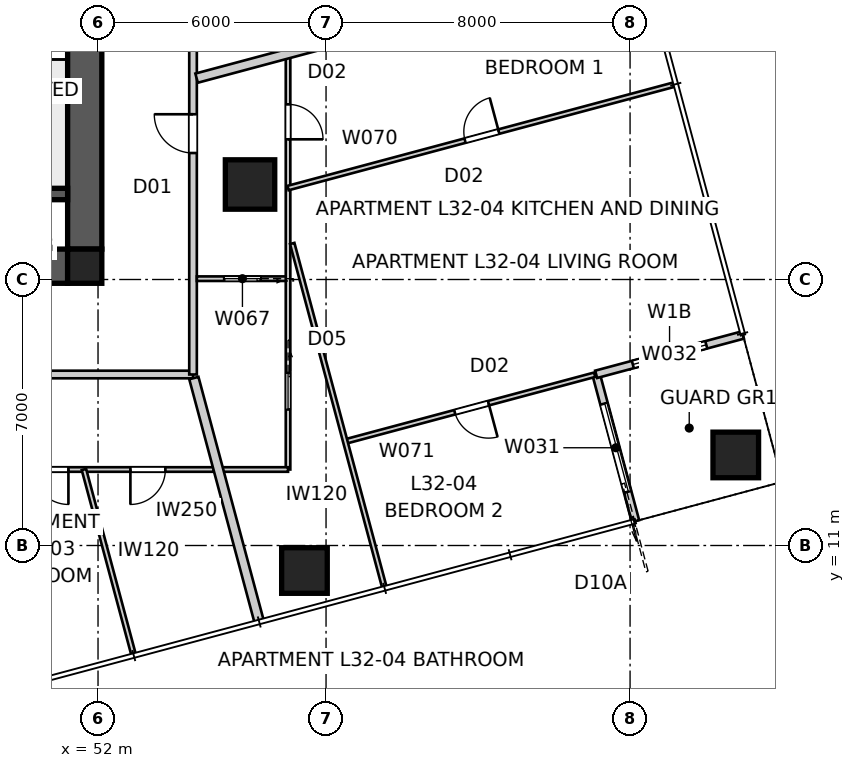
"""IFC4 building model, lengths in metres.
Left out: names, types, materials, properties, quantities, classifications, styles, units other than length and angle.
Written with IfcOpenShell. Run it as: python <this file> out.ifc"""

import sys

from ifc_helpers import new_model, si_unit, direction, frame, frame_2d, origin, origin_2d, place, context, subcontext, project, spatial, polyline, rectangle, outline, extrude, element, fill, save


model = new_model("IFC4")
c1 = context("Model", 3, precision=1e-05, world=origin(), true_north=direction((0.0, 1.0)))
c2 = subcontext(c1, "Body", "Model", "MODEL_VIEW")
j1 = project(units=[si_unit("LENGTHUNIT", "METRE"), si_unit("PLANEANGLEUNIT", "RADIAN")], contexts=[c1])
p1 = place(None, origin())
s1 = spatial("IfcSite", under=j1, at=p1, CompositionType="ELEMENT")
p2 = place(p1, origin())
s2 = spatial("IfcBuilding", under=s1, at=p2, CompositionType="ELEMENT")
p3 = place(p2, frame((0.0, 0.0, 118.4)))
s3 = spatial("IfcBuildingStorey", under=s2, at=p3, CompositionType="ELEMENT", Elevation=118.4)
p4 = place(p3, frame((51.2, 18.35, 0.0), z_axis=(0.0, 0.0, 1.0), x_axis=(-1.0, 0.0, 0.0)))
e1 = element("IfcWall", 1, at=p4, inside=s3, PredefinedType="SHEAR", context=c2, shape_type="SweptSolid", body=[
    extrude(outline(polyline([(0.0, -0.45), (22.4, -0.45), (22.4, -0.025), (22.85, -0.025), (22.85, 0.025), (22.4, 0.025), (22.4, 0.45), (0.0, 0.45), (0.0, 0.025), (-0.45, 0.025), (-0.45, -0.025), (0.0, -0.025), (0.0, -0.45)])), origin(), (0.0, 0.0, 1.0), 3.4),
])
p5 = place(p3, frame((51.65, 18.8, 0.0), z_axis=(0.0, 0.0, 1.0), x_axis=(0.0, 1.0, 0.0)))
e2 = element("IfcWall", 2, at=p5, inside=s3, PredefinedType="SHEAR", context=c2, shape_type="SweptSolid", body=[
    extrude(outline(polyline([(0.0, -0.45), (22.4, -0.45), (22.4, -0.025), (22.85, -0.025), (22.85, 0.025), (22.4, 0.025), (22.4, 0.45), (0.0, 0.45), (0.0, 0.025), (-0.45, 0.025), (-0.45, -0.025), (0.0, -0.025), (0.0, -0.45)])), origin(), (0.0, 0.0, 1.0), 3.4),
])
p6 = place(p5, frame((11.14, 0.0, 0.0)))
e3 = element("IfcOpeningElement", 3, at=p6, cuts=e2, PredefinedType="OPENING", context=c2, shape_type="SweptSolid", body=[
    extrude(rectangle(XDim=1.02, YDim=2.4, at=frame_2d((0.51, 1.2))), frame((0.0, 0.46, 0.0), z_axis=(0.0, -1.0, 0.0), x_axis=(1.0, 0.0, 0.0)), (0.0, 0.0, 1.0), 0.92),
])
p7 = place(p3, frame((51.2, 20.25, 0.0), z_axis=(0.0, 0.0, 1.0), x_axis=(-1.0, 0.0, 0.0)))
e4 = element("IfcWall", 4, at=p7, inside=s3, PredefinedType="SHEAR", context=c2, shape_type="SweptSolid", body=[
    extrude(rectangle(XDim=3.5, YDim=0.3, at=frame_2d((1.75, 0.0))), origin(), (0.0, 0.0, 1.0), 3.4),
])
p8 = place(p3, frame((51.65, 18.35, 0.0), z_axis=(0.0, 0.0, 1.0), x_axis=(1.0, 0.0, 0.0)))
e5 = element("IfcColumn", 5, at=p8, inside=s3, PredefinedType="COLUMN", context=c2, shape_type="SweptSolid", body=[
    extrude(rectangle(XDim=0.9, YDim=0.9, at=origin_2d()), origin(), (0.0, 0.0, 1.0), 3.4),
])
for number, where, z_axis, x_axis in (
    (6, (57.432, 10.342, 0.0), (0.0, 0.0, 1.0), (1.0, 0.0, 0.0)),
    (7, (68.781, 13.383, 0.0), (0.0, 0.0, 1.0), (1.0, 0.0, 0.0)),
):
    element("IfcColumn", number, at=place(p3, frame(where, z_axis=z_axis, x_axis=x_axis)), inside=s3, PredefinedType="COLUMN", context=c2, shape_type="SweptSolid", body=[
        extrude(rectangle(XDim=1.2, YDim=1.2, at=origin_2d()), origin(), (0.0, 0.0, 1.0), 3.4),
    ])
p9 = place(p3, frame((56.0, 20.5, 0.0), z_axis=(0.0, 0.0, 1.0), x_axis=(1.0, 0.0, 0.0)))
e8 = element("IfcColumn", 8, at=p9, inside=s3, PredefinedType="COLUMN", context=c2, shape_type="SweptSolid", body=[
    extrude(rectangle(XDim=1.3, YDim=1.3, at=origin_2d()), origin(), (0.0, 0.0, 1.0), 3.4),
])
p10 = place(p3, frame((66.143, 11.641, 0.0), z_axis=(0.0, 0.0, 1.0), x_axis=(-0.258843877716, 0.965919172068, 0.0)))
e9 = element("IfcWall", 9, at=p10, inside=s3, PredefinedType="SOLIDWALL", context=c2, shape_type="SweptSolid", body=[
    extrude(rectangle(XDim=4.0, YDim=0.2, at=frame_2d((2.0, 0.0))), origin(), (0.0, 0.0, 1.0), 3.25),
])
p11 = place(p10, frame((0.8, 0.0, 0.0)))
e10 = element("IfcOpeningElement", 10, at=p11, cuts=e9, PredefinedType="OPENING", context=c2, shape_type="SweptSolid", body=[
    extrude(rectangle(XDim=2.4, YDim=2.1, at=frame_2d((1.2, 1.05))), frame((0.0, 0.11, 0.0), z_axis=(0.0, -1.0, 0.0), x_axis=(1.0, 0.0, 0.0)), (0.0, 0.0, 1.0), 0.22),
])
p12 = place(p3, frame((65.107, 15.504, 0.0), z_axis=(0.0, 0.0, 1.0), x_axis=(0.965934430412, 0.258786931944, 0.0)))
e11 = element("IfcWall", 11, at=p12, inside=s3, PredefinedType="SOLIDWALL", context=c2, shape_type="SweptSolid", body=[
    extrude(rectangle(XDim=4.0, YDim=0.2, at=frame_2d((2.0, 0.0))), origin(), (0.0, 0.0, 1.0), 3.25),
])
p13 = place(p12, frame((1.0, 0.0, 0.45)))
e12 = element("IfcOpeningElement", 12, at=p13, cuts=e11, PredefinedType="OPENING", context=c2, shape_type="SweptSolid", body=[
    extrude(rectangle(XDim=2.0, YDim=1.8, at=frame_2d((1.0, 0.9))), frame((0.0, 0.11, 0.0), z_axis=(0.0, -1.0, 0.0), x_axis=(1.0, 0.0, 0.0)), (0.0, 0.0, 1.0), 0.22),
])
p14 = place(p3, frame((26.3, 15.5, 0.0), z_axis=(0.0, 0.0, 1.0), x_axis=(1.0, 0.0, 0.0)))
e13 = element("IfcWall", 13, at=p14, inside=s3, PredefinedType="PARTITIONING", context=c2, shape_type="SweptSolid", body=[
    extrude(rectangle(XDim=28.2, YDim=0.2, at=frame_2d((14.1, 0.0))), origin(), (0.0, 0.0, 1.0), 3.25),
])
p15 = place(p14, frame((21.474, 0.0, 0.0)))
e14 = element("IfcOpeningElement", 14, at=p15, cuts=e13, PredefinedType="OPENING", context=c2, shape_type="SweptSolid", body=[
    extrude(rectangle(XDim=1.02, YDim=2.34, at=frame_2d((0.51, 1.17))), frame((0.0, 0.11, 0.0), z_axis=(0.0, -1.0, 0.0), x_axis=(1.0, 0.0, 0.0)), (0.0, 0.0, 1.0), 0.22),
])
p16 = place(p14, frame((1.353, 0.0, 0.0)))
e15 = element("IfcOpeningElement", 15, at=p16, cuts=e13, PredefinedType="OPENING", context=c2, shape_type="SweptSolid", body=[
    extrude(rectangle(XDim=1.02, YDim=2.1, at=frame_2d((0.51, 1.05))), frame((0.0, 0.11, 0.0), z_axis=(0.0, -1.0, 0.0), x_axis=(1.0, 0.0, 0.0)), (0.0, 0.0, 1.0), 0.22),
])
p17 = place(p3, frame((54.5, 15.5, 0.0), z_axis=(0.0, 0.0, 1.0), x_axis=(0.0, 1.0, 0.0)))
e16 = element("IfcWall", 16, at=p17, inside=s3, PredefinedType="PARTITIONING", context=c2, shape_type="SweptSolid", body=[
    extrude(rectangle(XDim=29.0, YDim=0.2, at=frame_2d((14.5, 0.0))), origin(), (0.0, 0.0, 1.0), 3.25),
])
p18 = place(p17, frame((24.76, 0.0, 0.0)))
e17 = element("IfcOpeningElement", 17, at=p18, cuts=e16, PredefinedType="OPENING", context=c2, shape_type="SweptSolid", body=[
    extrude(rectangle(XDim=1.02, YDim=2.1, at=frame_2d((0.51, 1.05))), frame((0.0, 0.11, 0.0), z_axis=(0.0, -1.0, 0.0), x_axis=(1.0, 0.0, 0.0)), (0.0, 0.0, 1.0), 0.22),
])
p19 = place(p17, frame((5.829, 0.0, 0.0)))
e18 = element("IfcOpeningElement", 18, at=p19, cuts=e16, PredefinedType="OPENING", context=c2, shape_type="SweptSolid", body=[
    extrude(rectangle(XDim=1.02, YDim=2.34, at=frame_2d((0.51, 1.17))), frame((0.0, 0.11, 0.0), z_axis=(0.0, -1.0, 0.0), x_axis=(1.0, 0.0, 0.0)), (0.0, 0.0, 1.0), 0.22),
])
p20 = place(p17, frame((9.559, 0.0, 0.0)))
e19 = element("IfcOpeningElement", 19, at=p20, cuts=e16, PredefinedType="OPENING", context=c2, shape_type="SweptSolid", body=[
    extrude(rectangle(XDim=1.02, YDim=2.34, at=frame_2d((0.51, 1.17))), frame((0.0, 0.11, 0.0), z_axis=(0.0, -1.0, 0.0), x_axis=(1.0, 0.0, 0.0)), (0.0, 0.0, 1.0), 0.22),
])
p21 = place(p3, frame((56.242, 8.988, 0.0), z_axis=(0.0, 0.0, 1.0), x_axis=(-0.25880587229, 0.965929355837, 0.0)))
e20 = element("IfcWall", 20, at=p21, inside=s3, PredefinedType="PARTITIONING", context=c2, shape_type="SweptSolid", body=[
    extrude(rectangle(XDim=6.645, YDim=0.25, at=frame_2d((3.322, 0.0))), origin(), (0.0, 0.0, 1.0), 3.25),
])
p22 = place(p3, frame((66.318, 26.44, 0.0), z_axis=(0.0, 0.0, 1.0), x_axis=(-0.965924438766, -0.258824223352, 0.0)))
e21 = element("IfcWall", 21, at=p22, inside=s3, PredefinedType="PARTITIONING", context=c2, shape_type="SweptSolid", body=[
    extrude(rectangle(XDim=12.138, YDim=0.25, at=frame_2d((6.069, 0.0))), origin(), (0.0, 0.0, 1.0), 3.25),
])
p23 = place(p3, frame((55.046, 13.0, 0.0), z_axis=(0.0, 0.0, 1.0), x_axis=(-1.0, 0.0, 0.0)))
e22 = element("IfcWall", 22, at=p23, inside=s3, PredefinedType="PARTITIONING", context=c2, shape_type="SweptSolid", body=[
    extrude(rectangle(XDim=23.693, YDim=0.12, at=frame_2d((11.846, 0.0))), origin(), (0.0, 0.0, 1.0), 2.55),
])
p24 = place(p23, frame((8.262, 0.0, 0.0)))
e23 = element("IfcOpeningElement", 23, at=p24, cuts=e22, PredefinedType="OPENING", context=c2, shape_type="SweptSolid", body=[
    extrude(rectangle(XDim=0.92, YDim=2.34, at=frame_2d((0.46, 1.17))), frame((0.0, 0.07, 0.0), z_axis=(0.0, -1.0, 0.0), x_axis=(1.0, 0.0, 0.0)), (0.0, 0.0, 1.0), 0.14),
])
p25 = place(p23, frame((3.825, 0.0, 0.0)))
e24 = element("IfcOpeningElement", 24, at=p25, cuts=e22, PredefinedType="OPENING", context=c2, shape_type="SweptSolid", body=[
    extrude(rectangle(XDim=0.92, YDim=2.34, at=frame_2d((0.46, 1.17))), frame((0.0, 0.07, 0.0), z_axis=(0.0, -1.0, 0.0), x_axis=(1.0, 0.0, 0.0)), (0.0, 0.0, 1.0), 0.14),
])
p26 = place(p23, frame((1.274, 0.0, 0.0)))
e25 = element("IfcOpeningElement", 25, at=p26, cuts=e22, PredefinedType="OPENING", context=c2, shape_type="SweptSolid", body=[
    extrude(rectangle(XDim=0.92, YDim=2.34, at=frame_2d((0.46, 1.17))), frame((0.0, 0.07, 0.0), z_axis=(0.0, -1.0, 0.0), x_axis=(1.0, 0.0, 0.0)), (0.0, 0.0, 1.0), 0.14),
])
p27 = place(p23, frame((13.041, 0.0, 0.0)))
e26 = element("IfcOpeningElement", 26, at=p27, cuts=e22, PredefinedType="OPENING", context=c2, shape_type="SweptSolid", body=[
    extrude(rectangle(XDim=0.96, YDim=2.1, at=frame_2d((0.48, 1.05))), frame((0.0, 0.07, 0.0), z_axis=(0.0, -1.0, 0.0), x_axis=(1.0, 0.0, 0.0)), (0.0, 0.0, 1.0), 0.14),
])
p28 = place(p23, frame((21.917, 0.0, 0.0)))
e27 = element("IfcOpeningElement", 27, at=p28, cuts=e22, PredefinedType="OPENING", context=c2, shape_type="SweptSolid", body=[
    extrude(rectangle(XDim=0.96, YDim=2.1, at=frame_2d((0.48, 1.05))), frame((0.0, 0.07, 0.0), z_axis=(0.0, -1.0, 0.0), x_axis=(1.0, 0.0, 0.0)), (0.0, 0.0, 1.0), 0.14),
])
p29 = place(p3, frame((51.63, 13.0, 0.0), z_axis=(0.0, 0.0, 1.0), x_axis=(0.258789467631, -0.965933751063, 0.0)))
e28 = element("IfcWall", 28, at=p29, inside=s3, PredefinedType="PARTITIONING", context=c2, shape_type="SweptSolid", body=[
    extrude(rectangle(XDim=5.029, YDim=0.12, at=frame_2d((2.515, 0.0))), origin(), (0.0, 0.0, 1.0), 3.25),
])
p30 = place(p3, frame((57.0, 18.021, 0.0), z_axis=(0.0, 0.0, 1.0), x_axis=(-1.0, 0.0, 0.0)))
e29 = element("IfcWall", 29, at=p30, inside=s3, PredefinedType="PARTITIONING", context=c2, shape_type="SweptSolid", body=[
    extrude(rectangle(XDim=2.4, YDim=0.12, at=frame_2d((1.2, 0.0))), origin(), (0.0, 0.0, 1.0), 3.25),
])
p31 = place(p30, frame((0.72, 0.0, 0.0)))
e30 = element("IfcOpeningElement", 30, at=p31, cuts=e29, PredefinedType="OPENING", context=c2, shape_type="SweptSolid", body=[
    extrude(rectangle(XDim=0.96, YDim=2.1, at=frame_2d((0.48, 1.05))), frame((0.0, 0.07, 0.0), z_axis=(0.0, -1.0, 0.0), x_axis=(1.0, 0.0, 0.0)), (0.0, 0.0, 1.0), 0.14),
])
p32 = place(p3, frame((57.0, 47.0, 0.0), z_axis=(0.0, 0.0, 1.0), x_axis=(0.0, -1.0, 0.0)))
e31 = element("IfcWall", 31, at=p32, inside=s3, PredefinedType="PARTITIONING", context=c2, shape_type="SweptSolid", body=[
    extrude(rectangle(XDim=34.0, YDim=0.12, at=frame_2d((17.0, 0.0))), origin(), (0.0, 0.0, 1.0), 2.55),
])
p33 = place(p32, frame((8.23, 0.0, 0.0)))
e32 = element("IfcOpeningElement", 32, at=p33, cuts=e31, PredefinedType="OPENING", context=c2, shape_type="SweptSolid", body=[
    extrude(rectangle(XDim=0.92, YDim=2.34, at=frame_2d((0.46, 1.17))), frame((0.0, 0.07, 0.0), z_axis=(0.0, -1.0, 0.0), x_axis=(1.0, 0.0, 0.0)), (0.0, 0.0, 1.0), 0.14),
])
p34 = place(p32, frame((3.192, 0.0, 0.0)))
e33 = element("IfcOpeningElement", 33, at=p34, cuts=e31, PredefinedType="OPENING", context=c2, shape_type="SweptSolid", body=[
    extrude(rectangle(XDim=0.92, YDim=2.34, at=frame_2d((0.46, 1.17))), frame((0.0, 0.07, 0.0), z_axis=(0.0, -1.0, 0.0), x_axis=(1.0, 0.0, 0.0)), (0.0, 0.0, 1.0), 0.14),
])
p35 = place(p32, frame((24.391, 0.0, 0.0)))
e34 = element("IfcOpeningElement", 34, at=p35, cuts=e31, PredefinedType="OPENING", context=c2, shape_type="SweptSolid", body=[
    extrude(rectangle(XDim=0.92, YDim=2.34, at=frame_2d((0.46, 1.17))), frame((0.0, 0.07, 0.0), z_axis=(0.0, -1.0, 0.0), x_axis=(1.0, 0.0, 0.0)), (0.0, 0.0, 1.0), 0.14),
])
p36 = place(p32, frame((21.702, 0.0, 0.0)))
e35 = element("IfcOpeningElement", 35, at=p36, cuts=e31, PredefinedType="OPENING", context=c2, shape_type="SweptSolid", body=[
    extrude(rectangle(XDim=0.92, YDim=2.34, at=frame_2d((0.46, 1.17))), frame((0.0, 0.07, 0.0), z_axis=(0.0, -1.0, 0.0), x_axis=(1.0, 0.0, 0.0)), (0.0, 0.0, 1.0), 0.14),
])
p37 = place(p32, frame((31.459, 0.0, 0.0)))
e36 = element("IfcOpeningElement", 36, at=p37, cuts=e31, PredefinedType="OPENING", context=c2, shape_type="SweptSolid", body=[
    extrude(rectangle(XDim=0.96, YDim=2.1, at=frame_2d((0.48, 1.05))), frame((0.0, 0.07, 0.0), z_axis=(0.0, -1.0, 0.0), x_axis=(1.0, 0.0, 0.0)), (0.0, 0.0, 1.0), 0.14),
])
p38 = place(p32, frame((13.759, 0.0, 0.0)))
e37 = element("IfcOpeningElement", 37, at=p38, cuts=e31, PredefinedType="OPENING", context=c2, shape_type="SweptSolid", body=[
    extrude(rectangle(XDim=0.96, YDim=2.1, at=frame_2d((0.48, 1.05))), frame((0.0, 0.07, 0.0), z_axis=(0.0, -1.0, 0.0), x_axis=(1.0, 0.0, 0.0)), (0.0, 0.0, 1.0), 0.14),
])
p39 = place(p3, frame((57.0, 13.0, 0.0), z_axis=(0.0, 0.0, 1.0), x_axis=(-1.0, 0.0, 0.0)))
e38 = element("IfcWall", 38, at=p39, inside=s3, PredefinedType="PARTITIONING", context=c2, shape_type="SweptSolid", body=[
    extrude(rectangle(XDim=1.833, YDim=0.12, at=frame_2d((0.917, 0.0))), origin(), (0.0, 0.0, 1.0), 3.25),
])
p40 = place(p3, frame((57.0, 20.406, 0.0), z_axis=(0.0, 0.0, 1.0), x_axis=(0.9659257847, 0.258819200315, 0.0)))
e39 = element("IfcWall", 39, at=p40, inside=s3, PredefinedType="PARTITIONING", context=c2, shape_type="SweptSolid", body=[
    extrude(rectangle(XDim=10.522, YDim=0.12, at=frame_2d((5.261, 0.0))), origin(), (0.0, 0.0, 1.0), 2.722),
])
p41 = place(p40, frame((4.821, 0.0, 0.0)))
e40 = element("IfcOpeningElement", 40, at=p41, cuts=e39, PredefinedType="OPENING", context=c2, shape_type="SweptSolid", body=[
    extrude(rectangle(XDim=0.92, YDim=2.34, at=frame_2d((0.46, 1.17))), frame((0.0, 0.07, 0.0), z_axis=(0.0, -1.0, 0.0), x_axis=(1.0, 0.0, 0.0)), (0.0, 0.0, 1.0), 0.14),
])
p42 = place(p3, frame((65.069, 15.494, 0.0), z_axis=(0.0, 0.0, 1.0), x_axis=(-0.965922865286, -0.258830095464, 0.0)))
e41 = element("IfcWall", 41, at=p42, inside=s3, PredefinedType="PARTITIONING", context=c2, shape_type="SweptSolid", body=[
    extrude(rectangle(XDim=6.793, YDim=0.12, at=frame_2d((3.396, 0.0))), origin(), (0.0, 0.0, 1.0), 3.25),
])
p43 = place(p42, frame((2.892, 0.0, 0.0)))
e42 = element("IfcOpeningElement", 42, at=p43, cuts=e41, PredefinedType="OPENING", context=c2, shape_type="SweptSolid", body=[
    extrude(rectangle(XDim=0.92, YDim=2.34, at=frame_2d((0.46, 1.17))), frame((0.0, 0.07, 0.0), z_axis=(0.0, -1.0, 0.0), x_axis=(1.0, 0.0, 0.0)), (0.0, 0.0, 1.0), 0.14),
])
p44 = place(p3, frame((59.532, 9.911, 0.0), z_axis=(0.0, 0.0, 1.0), x_axis=(-0.25881390457, 0.965927203676, 0.0)))
e43 = element("IfcWall", 43, at=p44, inside=s3, PredefinedType="PARTITIONING", context=c2, shape_type="SweptSolid", body=[
    extrude(rectangle(XDim=9.357, YDim=0.12, at=frame_2d((4.678, 0.0))), origin(), (0.0, 0.0, 1.0), 2.638),
])
p45 = place(p11, origin())
e44 = element("IfcDoor", 44, at=p45, inside=s3, OperationType="SLIDING_TO_LEFT", PredefinedType="DOOR", context=c2, shape_type="SweptSolid", body=[
    extrude(rectangle(XDim=2.4, YDim=2.1, at=frame_2d((1.2, 1.05))), frame((0.0, 0.025, 0.0), z_axis=(0.0, -1.0, 0.0), x_axis=(1.0, 0.0, 0.0)), (0.0, 0.0, 1.0), 0.05),
])
fill(e10, e44)
p46 = place(p13, origin())
e45 = element("IfcWindow", 45, at=p46, inside=s3, PartitioningType="SINGLE_PANEL", PredefinedType="WINDOW", context=c2, shape_type="SweptSolid", body=[
    extrude(rectangle(XDim=2.0, YDim=1.8, at=frame_2d((1.0, 0.9))), frame((0.0, 0.03, 0.0), z_axis=(0.0, -1.0, 0.0), x_axis=(1.0, 0.0, 0.0)), (0.0, 0.0, 1.0), 0.06),
])
fill(e12, e45)
p47 = place(p19, origin())
e46 = element("IfcDoor", 46, at=p47, inside=s3, OperationType="SINGLE_SWING_RIGHT", PredefinedType="DOOR", context=c2, shape_type="SweptSolid", body=[
    extrude(rectangle(XDim=1.02, YDim=2.34, at=frame_2d((0.51, 1.17))), frame((0.0, 0.025, 0.0), z_axis=(0.0, -1.0, 0.0), x_axis=(1.0, 0.0, 0.0)), (0.0, 0.0, 1.0), 0.05),
])
fill(e18, e46)
p48 = place(p25, origin())
e47 = element("IfcDoor", 47, at=p48, inside=s3, OperationType="SINGLE_SWING_LEFT", PredefinedType="DOOR", context=c2, shape_type="SweptSolid", body=[
    extrude(rectangle(XDim=0.92, YDim=2.34, at=frame_2d((0.46, 1.17))), frame((0.0, 0.025, 0.0), z_axis=(0.0, -1.0, 0.0), x_axis=(1.0, 0.0, 0.0)), (0.0, 0.0, 1.0), 0.05),
])
fill(e24, e47)
p49 = place(p26, origin())
e48 = element("IfcDoor", 48, at=p49, inside=s3, OperationType="SINGLE_SWING_RIGHT", PredefinedType="DOOR", context=c2, shape_type="SweptSolid", body=[
    extrude(rectangle(XDim=0.92, YDim=2.34, at=frame_2d((0.46, 1.17))), frame((0.0, 0.025, 0.0), z_axis=(0.0, -1.0, 0.0), x_axis=(1.0, 0.0, 0.0)), (0.0, 0.0, 1.0), 0.05),
])
fill(e25, e48)
p50 = place(p35, origin())
e49 = element("IfcDoor", 49, at=p50, inside=s3, OperationType="SINGLE_SWING_RIGHT", PredefinedType="DOOR", context=c2, shape_type="SweptSolid", body=[
    extrude(rectangle(XDim=0.92, YDim=2.34, at=frame_2d((0.46, 1.17))), frame((0.0, 0.025, 0.0), z_axis=(0.0, -1.0, 0.0), x_axis=(1.0, 0.0, 0.0)), (0.0, 0.0, 1.0), 0.05),
])
fill(e34, e49)
p51 = place(p31, origin())
e50 = element("IfcDoor", 50, at=p51, inside=s3, OperationType="SLIDING_TO_LEFT", PredefinedType="DOOR", context=c2, shape_type="SweptSolid", body=[
    extrude(rectangle(XDim=0.96, YDim=2.1, at=frame_2d((0.48, 1.05))), frame((0.0, 0.025, 0.0), z_axis=(0.0, -1.0, 0.0), x_axis=(1.0, 0.0, 0.0)), (0.0, 0.0, 1.0), 0.05),
])
fill(e30, e50)
p52 = place(p37, origin())
e51 = element("IfcDoor", 51, at=p52, inside=s3, OperationType="SLIDING_TO_LEFT", PredefinedType="DOOR", context=c2, shape_type="SweptSolid", body=[
    extrude(rectangle(XDim=0.96, YDim=2.1, at=frame_2d((0.48, 1.05))), frame((0.0, 0.025, 0.0), z_axis=(0.0, -1.0, 0.0), x_axis=(1.0, 0.0, 0.0)), (0.0, 0.0, 1.0), 0.05),
])
fill(e36, e51)
p53 = place(p41, origin())
e52 = element("IfcDoor", 52, at=p53, inside=s3, OperationType="SINGLE_SWING_RIGHT", PredefinedType="DOOR", context=c2, shape_type="SweptSolid", body=[
    extrude(rectangle(XDim=0.92, YDim=2.34, at=frame_2d((0.46, 1.17))), frame((0.0, 0.025, 0.0), z_axis=(0.0, -1.0, 0.0), x_axis=(1.0, 0.0, 0.0)), (0.0, 0.0, 1.0), 0.05),
])
fill(e40, e52)
p54 = place(p43, origin())
e53 = element("IfcDoor", 53, at=p54, inside=s3, OperationType="SINGLE_SWING_LEFT", PredefinedType="DOOR", context=c2, shape_type="SweptSolid", body=[
    extrude(rectangle(XDim=0.92, YDim=2.34, at=frame_2d((0.46, 1.17))), frame((0.0, 0.025, 0.0), z_axis=(0.0, -1.0, 0.0), x_axis=(1.0, 0.0, 0.0)), (0.0, 0.0, 1.0), 0.05),
])
fill(e42, e53)
save(model, sys.argv[1])
